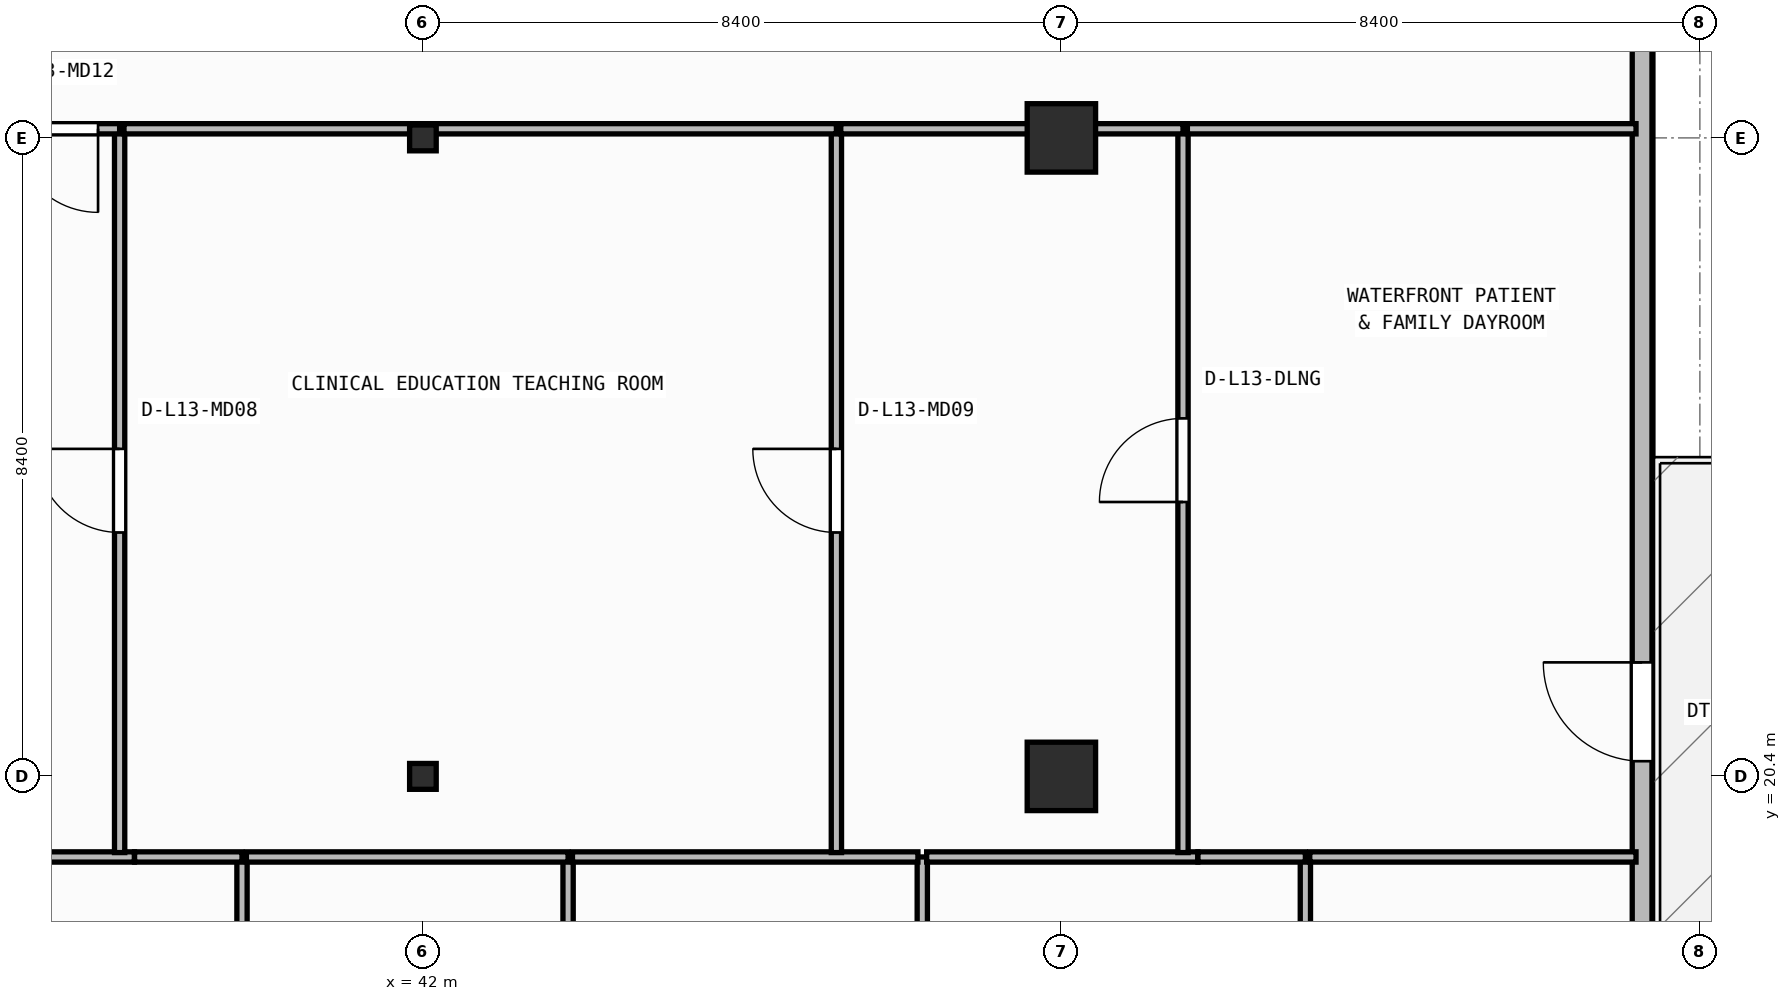
"""IFC4 building model, lengths in metres.
Left out: names, types, materials, properties, quantities, classifications, styles, units other than length and angle.
Written with IfcOpenShell. Run it as: python <this file> out.ifc"""

import sys

from ifc_helpers import new_model, si_unit, direction, frame, frame_2d, origin, origin_2d, place, context, subcontext, project, spatial, rectangle, i_section, extrude, element, fill, save


model = new_model("IFC4")
c1 = context("Model", 3, precision=1e-05, world=origin(), true_north=direction((0.0, 1.0)))
c2 = subcontext(c1, "Body", "Model", "MODEL_VIEW")
j1 = project(units=[si_unit("LENGTHUNIT", "METRE"), si_unit("PLANEANGLEUNIT", "RADIAN")], contexts=[c1])
p1 = place(None, origin())
s1 = spatial("IfcSite", under=j1, at=p1, CompositionType="ELEMENT")
p2 = place(p1, origin())
s2 = spatial("IfcBuilding", under=s1, at=p2, CompositionType="ELEMENT")
p3 = place(p2, frame((0.0, 0.0, 54.1)))
s3 = spatial("IfcBuildingStorey", under=s2, at=p3, CompositionType="ELEMENT", Elevation=54.1)
p4 = place(p3, frame((42.0, 20.4, 0.0), z_axis=(0.0, 0.0, 1.0), x_axis=(1.0, 0.0, 0.0)))
e1 = element("IfcColumn", 1, at=p4, inside=s3, PredefinedType="COLUMN", context=c2, shape_type="SweptSolid", body=[
    extrude(i_section(OverallWidth=0.35, OverallDepth=0.34, WebThickness=0.016, FlangeThickness=0.028, at=origin_2d()), origin(), (0.0, 0.0, 1.0), 3.95),
])
p5 = place(p3, frame((50.4, 20.4, 0.0), z_axis=(0.0, 0.0, 1.0), x_axis=(1.0, 0.0, 0.0)))
e2 = element("IfcColumn", 2, at=p5, inside=s3, PredefinedType="COLUMN", context=c2, shape_type="SweptSolid", body=[
    extrude(rectangle(XDim=0.9, YDim=0.9, at=origin_2d()), origin(), (0.0, 0.0, 1.0), 3.95),
])
p6 = place(p3, frame((42.0, 28.8, 0.0), z_axis=(0.0, 0.0, 1.0), x_axis=(1.0, 0.0, 0.0)))
e3 = element("IfcColumn", 3, at=p6, inside=s3, PredefinedType="COLUMN", context=c2, shape_type="SweptSolid", body=[
    extrude(i_section(OverallWidth=0.35, OverallDepth=0.34, WebThickness=0.016, FlangeThickness=0.028, at=origin_2d()), origin(), (0.0, 0.0, 1.0), 3.95),
])
p7 = place(p3, frame((50.4, 28.8, 0.0), z_axis=(0.0, 0.0, 1.0), x_axis=(1.0, 0.0, 0.0)))
e4 = element("IfcColumn", 4, at=p7, inside=s3, PredefinedType="COLUMN", context=c2, shape_type="SweptSolid", body=[
    extrude(rectangle(XDim=0.9, YDim=0.9, at=origin_2d()), origin(), (0.0, 0.0, 1.0), 3.95),
])
p8 = place(p3, frame((58.04, 7.16, 0.0), z_axis=(0.0, 0.0, 1.0), x_axis=(0.0, 1.0, 0.0)))
e5 = element("IfcWall", 5, at=p8, inside=s3, PredefinedType="STANDARD", context=c2, shape_type="SweptSolid", body=[
    extrude(rectangle(XDim=24.48, YDim=0.26, at=frame_2d((12.24, 0.0))), origin(), (0.0, 0.0, 1.0), 3.71),
])
p9 = place(p8, frame((13.44, 0.0, 0.0)))
e6 = element("IfcOpeningElement", 6, at=p9, cuts=e5, PredefinedType="OPENING", context=c2, shape_type="SweptSolid", body=[
    extrude(rectangle(XDim=1.3, YDim=2.15, at=frame_2d((0.65, 1.075))), frame((0.0, 0.14, 0.0), z_axis=(0.0, -1.0, 0.0), x_axis=(1.0, 0.0, 0.0)), (0.0, 0.0, 1.0), 0.28),
])
p10 = place(p8, frame((8.65, 0.0, 0.9)))
e7 = element("IfcOpeningElement", 7, at=p10, cuts=e5, PredefinedType="OPENING", context=c2, shape_type="SweptSolid", body=[
    extrude(rectangle(XDim=2.4, YDim=1.65, at=frame_2d((1.2, 0.825))), frame((0.0, 0.14, 0.0), z_axis=(0.0, -1.0, 0.0), x_axis=(1.0, 0.0, 0.0)), (0.0, 0.0, 1.0), 0.28),
])
p11 = place(p3, frame((39.62, 17.833, 0.0), z_axis=(0.0, 0.0, 1.0), x_axis=(0.0, 1.0, 0.0)))
e8 = element("IfcWall", 8, at=p11, inside=s3, PredefinedType="PARTITIONING", context=c2, shape_type="SweptSolid", body=[
    extrude(rectangle(XDim=1.508, YDim=0.135, at=frame_2d((0.754, 0.0))), origin(), (0.0, 0.0, 1.0), 3.71),
])
p12 = place(p3, frame((38.205, 19.34, 0.0), z_axis=(0.0, 0.0, 1.0), x_axis=(-1.0, 0.0, 0.0)))
e9 = element("IfcWall", 9, at=p12, inside=s3, PredefinedType="PARTITIONING", context=c2, shape_type="SweptSolid", body=[
    extrude(rectangle(XDim=3.567, YDim=0.135, at=frame_2d((1.784, 0.0))), origin(), (0.0, 0.0, 1.0), 3.71),
])
p13 = place(p3, frame((39.62, 19.34, 0.0), z_axis=(0.0, 0.0, 1.0), x_axis=(-1.0, 0.0, 0.0)))
e10 = element("IfcWall", 10, at=p13, inside=s3, PredefinedType="PARTITIONING", context=c2, shape_type="SweptSolid", body=[
    extrude(rectangle(XDim=1.414, YDim=0.135, at=frame_2d((0.707, 0.0))), origin(), (0.0, 0.0, 1.0), 3.71),
])
p14 = place(p3, frame((43.91, 17.833, 0.0), z_axis=(0.0, 0.0, 1.0), x_axis=(0.0, 1.0, 0.0)))
e11 = element("IfcWall", 11, at=p14, inside=s3, PredefinedType="PARTITIONING", context=c2, shape_type="SweptSolid", body=[
    extrude(rectangle(XDim=1.508, YDim=0.135, at=frame_2d((0.754, 0.0))), origin(), (0.0, 0.0, 1.0), 3.71),
])
p15 = place(p3, frame((43.91, 19.34, 0.0), z_axis=(0.0, 0.0, 1.0), x_axis=(-1.0, 0.0, 0.0)))
e12 = element("IfcWall", 12, at=p15, inside=s3, PredefinedType="PARTITIONING", context=c2, shape_type="SweptSolid", body=[
    extrude(rectangle(XDim=4.232, YDim=0.135, at=frame_2d((2.116, 0.0))), origin(), (0.0, 0.0, 1.0), 3.71),
])
p16 = place(p3, frame((48.57, 17.833, 0.0), z_axis=(0.0, 0.0, 1.0), x_axis=(0.0, 1.0, 0.0)))
e13 = element("IfcWall", 13, at=p16, inside=s3, PredefinedType="PARTITIONING", context=c2, shape_type="SweptSolid", body=[
    extrude(rectangle(XDim=1.508, YDim=0.135, at=frame_2d((0.754, 0.0))), origin(), (0.0, 0.0, 1.0), 3.71),
])
p17 = place(p3, frame((48.512, 19.34, 0.0), z_axis=(0.0, 0.0, 1.0), x_axis=(-1.0, 0.0, 0.0)))
e14 = element("IfcWall", 14, at=p17, inside=s3, PredefinedType="PARTITIONING", context=c2, shape_type="SweptSolid", body=[
    extrude(rectangle(XDim=4.545, YDim=0.135, at=frame_2d((2.272, 0.0))), origin(), (0.0, 0.0, 1.0), 3.71),
])
p18 = place(p3, frame((53.61, 17.833, 0.0), z_axis=(0.0, 0.0, 1.0), x_axis=(0.0, 1.0, 0.0)))
e15 = element("IfcWall", 15, at=p18, inside=s3, PredefinedType="PARTITIONING", context=c2, shape_type="SweptSolid", body=[
    extrude(rectangle(XDim=1.508, YDim=0.135, at=frame_2d((0.754, 0.0))), origin(), (0.0, 0.0, 1.0), 3.71),
])
p19 = place(p3, frame((52.195, 19.34, 0.0), z_axis=(0.0, 0.0, 1.0), x_axis=(-1.0, 0.0, 0.0)))
e16 = element("IfcWall", 16, at=p19, inside=s3, PredefinedType="PARTITIONING", context=c2, shape_type="SweptSolid", body=[
    extrude(rectangle(XDim=3.567, YDim=0.135, at=frame_2d((1.784, 0.0))), origin(), (0.0, 0.0, 1.0), 3.71),
])
p20 = place(p3, frame((53.61, 19.34, 0.0), z_axis=(0.0, 0.0, 1.0), x_axis=(-1.0, 0.0, 0.0)))
e17 = element("IfcWall", 17, at=p20, inside=s3, PredefinedType="PARTITIONING", context=c2, shape_type="SweptSolid", body=[
    extrude(rectangle(XDim=1.414, YDim=0.135, at=frame_2d((0.707, 0.0))), origin(), (0.0, 0.0, 1.0), 3.71),
])
p21 = place(p3, frame((57.96, 19.34, 0.0), z_axis=(0.0, 0.0, 1.0), x_axis=(-1.0, 0.0, 0.0)))
e18 = element("IfcWall", 18, at=p21, inside=s3, PredefinedType="PARTITIONING", context=c2, shape_type="SweptSolid", body=[
    extrude(rectangle(XDim=4.292, YDim=0.135, at=frame_2d((2.146, 0.0))), origin(), (0.0, 0.0, 1.0), 3.71),
])
p22 = place(p3, frame((38.01, 19.397, 0.0), z_axis=(0.0, 0.0, 1.0), x_axis=(0.0, 1.0, 0.0)))
e19 = element("IfcWall", 19, at=p22, inside=s3, PredefinedType="PARTITIONING", context=c2, shape_type="SweptSolid", body=[
    extrude(rectangle(XDim=9.522, YDim=0.135, at=frame_2d((4.761, 0.0))), origin(), (0.0, 0.0, 1.0), 3.71),
])
p23 = place(p22, frame((4.211, 0.0, 0.0)))
e20 = element("IfcOpeningElement", 20, at=p23, cuts=e19, PredefinedType="OPENING", context=c2, shape_type="SweptSolid", body=[
    extrude(rectangle(XDim=1.1, YDim=2.1, at=frame_2d((0.55, 1.05))), frame((0.0, 0.077, 0.0), z_axis=(0.0, -1.0, 0.0), x_axis=(1.0, 0.0, 0.0)), (0.0, 0.0, 1.0), 0.155),
])
p24 = place(p3, frame((38.01, 28.92, 0.0), z_axis=(0.0, 0.0, 1.0), x_axis=(-1.0, 0.0, 0.0)))
e21 = element("IfcWall", 21, at=p24, inside=s3, PredefinedType="PARTITIONING", context=c2, shape_type="SweptSolid", body=[
    extrude(rectangle(XDim=4.858, YDim=0.135, at=frame_2d((2.429, 0.0))), origin(), (0.0, 0.0, 1.0), 3.326),
])
p25 = place(p24, frame((0.284, 0.0, 0.0)))
e22 = element("IfcOpeningElement", 22, at=p25, cuts=e21, PredefinedType="OPENING", context=c2, shape_type="SweptSolid", body=[
    extrude(rectangle(XDim=1.1, YDim=2.1, at=frame_2d((0.55, 1.05))), frame((0.0, 0.077, 0.0), z_axis=(0.0, -1.0, 0.0), x_axis=(1.0, 0.0, 0.0)), (0.0, 0.0, 1.0), 0.155),
])
p26 = place(p3, frame((47.44, 19.397, 0.0), z_axis=(0.0, 0.0, 1.0), x_axis=(0.0, 1.0, 0.0)))
e23 = element("IfcWall", 23, at=p26, inside=s3, PredefinedType="PARTITIONING", context=c2, shape_type="SweptSolid", body=[
    extrude(rectangle(XDim=9.522, YDim=0.135, at=frame_2d((4.761, 0.0))), origin(), (0.0, 0.0, 1.0), 3.71),
])
p27 = place(p26, frame((4.211, 0.0, 0.0)))
e24 = element("IfcOpeningElement", 24, at=p27, cuts=e23, PredefinedType="OPENING", context=c2, shape_type="SweptSolid", body=[
    extrude(rectangle(XDim=1.1, YDim=2.1, at=frame_2d((0.55, 1.05))), frame((0.0, 0.077, 0.0), z_axis=(0.0, -1.0, 0.0), x_axis=(1.0, 0.0, 0.0)), (0.0, 0.0, 1.0), 0.155),
])
p28 = place(p3, frame((47.44, 28.92, 0.0), z_axis=(0.0, 0.0, 1.0), x_axis=(-1.0, 0.0, 0.0)))
e25 = element("IfcWall", 25, at=p28, inside=s3, PredefinedType="PARTITIONING", context=c2, shape_type="SweptSolid", body=[
    extrude(rectangle(XDim=9.373, YDim=0.135, at=frame_2d((4.686, 0.0))), origin(), (0.0, 0.0, 1.0), 3.073),
])
p29 = place(p3, frame((52.0, 19.397, 0.0), z_axis=(0.0, 0.0, 1.0), x_axis=(0.0, 1.0, 0.0)))
e26 = element("IfcWall", 26, at=p29, inside=s3, PredefinedType="PARTITIONING", context=c2, shape_type="SweptSolid", body=[
    extrude(rectangle(XDim=9.522, YDim=0.135, at=frame_2d((4.761, 0.0))), origin(), (0.0, 0.0, 1.0), 3.71),
])
p30 = place(p29, frame((4.612, 0.0, 0.0)))
e27 = element("IfcOpeningElement", 27, at=p30, cuts=e26, PredefinedType="OPENING", context=c2, shape_type="SweptSolid", body=[
    extrude(rectangle(XDim=1.1, YDim=2.1, at=frame_2d((0.55, 1.05))), frame((0.0, 0.077, 0.0), z_axis=(0.0, -1.0, 0.0), x_axis=(1.0, 0.0, 0.0)), (0.0, 0.0, 1.0), 0.155),
])
p31 = place(p3, frame((52.0, 28.92, 0.0), z_axis=(0.0, 0.0, 1.0), x_axis=(-1.0, 0.0, 0.0)))
e28 = element("IfcWall", 28, at=p31, inside=s3, PredefinedType="PARTITIONING", context=c2, shape_type="SweptSolid", body=[
    extrude(rectangle(XDim=4.502, YDim=0.135, at=frame_2d((2.251, 0.0))), origin(), (0.0, 0.0, 1.0), 3.073),
])
p32 = place(p3, frame((57.96, 28.92, 0.0), z_axis=(0.0, 0.0, 1.0), x_axis=(-1.0, 0.0, 0.0)))
e29 = element("IfcWall", 29, at=p32, inside=s3, PredefinedType="PARTITIONING", context=c2, shape_type="SweptSolid", body=[
    extrude(rectangle(XDim=5.902, YDim=0.135, at=frame_2d((2.951, 0.0))), origin(), (0.0, 0.0, 1.0), 3.71),
])
p33 = place(p9, origin())
e30 = element("IfcDoor", 30, at=p33, inside=s3, OperationType="SINGLE_SWING_RIGHT", PredefinedType="DOOR", context=c2, shape_type="SweptSolid", body=[
    extrude(rectangle(XDim=1.3, YDim=2.15, at=frame_2d((0.65, 1.075))), frame((0.0, 0.025, 0.0), z_axis=(0.0, -1.0, 0.0), x_axis=(1.0, 0.0, 0.0)), (0.0, 0.0, 1.0), 0.05),
])
fill(e6, e30)
p34 = place(p23, origin())
e31 = element("IfcDoor", 31, at=p34, inside=s3, OperationType="SINGLE_SWING_RIGHT", PredefinedType="DOOR", context=c2, shape_type="SweptSolid", body=[
    extrude(rectangle(XDim=1.1, YDim=2.1, at=frame_2d((0.55, 1.05))), frame((0.0, 0.025, 0.0), z_axis=(0.0, -1.0, 0.0), x_axis=(1.0, 0.0, 0.0)), (0.0, 0.0, 1.0), 0.05),
])
fill(e20, e31)
p35 = place(p25, origin())
e32 = element("IfcDoor", 32, at=p35, inside=s3, OperationType="SINGLE_SWING_LEFT", PredefinedType="DOOR", context=c2, shape_type="SweptSolid", body=[
    extrude(rectangle(XDim=1.1, YDim=2.1, at=frame_2d((0.55, 1.05))), frame((0.0, 0.025, 0.0), z_axis=(0.0, -1.0, 0.0), x_axis=(1.0, 0.0, 0.0)), (0.0, 0.0, 1.0), 0.05),
])
fill(e22, e32)
p36 = place(p27, origin())
e33 = element("IfcDoor", 33, at=p36, inside=s3, OperationType="SINGLE_SWING_RIGHT", PredefinedType="DOOR", context=c2, shape_type="SweptSolid", body=[
    extrude(rectangle(XDim=1.1, YDim=2.1, at=frame_2d((0.55, 1.05))), frame((0.0, 0.025, 0.0), z_axis=(0.0, -1.0, 0.0), x_axis=(1.0, 0.0, 0.0)), (0.0, 0.0, 1.0), 0.05),
])
fill(e24, e33)
p37 = place(p30, origin())
e34 = element("IfcDoor", 34, at=p37, inside=s3, OperationType="SINGLE_SWING_LEFT", PredefinedType="DOOR", context=c2, shape_type="SweptSolid", body=[
    extrude(rectangle(XDim=1.1, YDim=2.1, at=frame_2d((0.55, 1.05))), frame((0.0, 0.025, 0.0), z_axis=(0.0, -1.0, 0.0), x_axis=(1.0, 0.0, 0.0)), (0.0, 0.0, 1.0), 0.05),
])
fill(e27, e34)
save(model, sys.argv[1])
